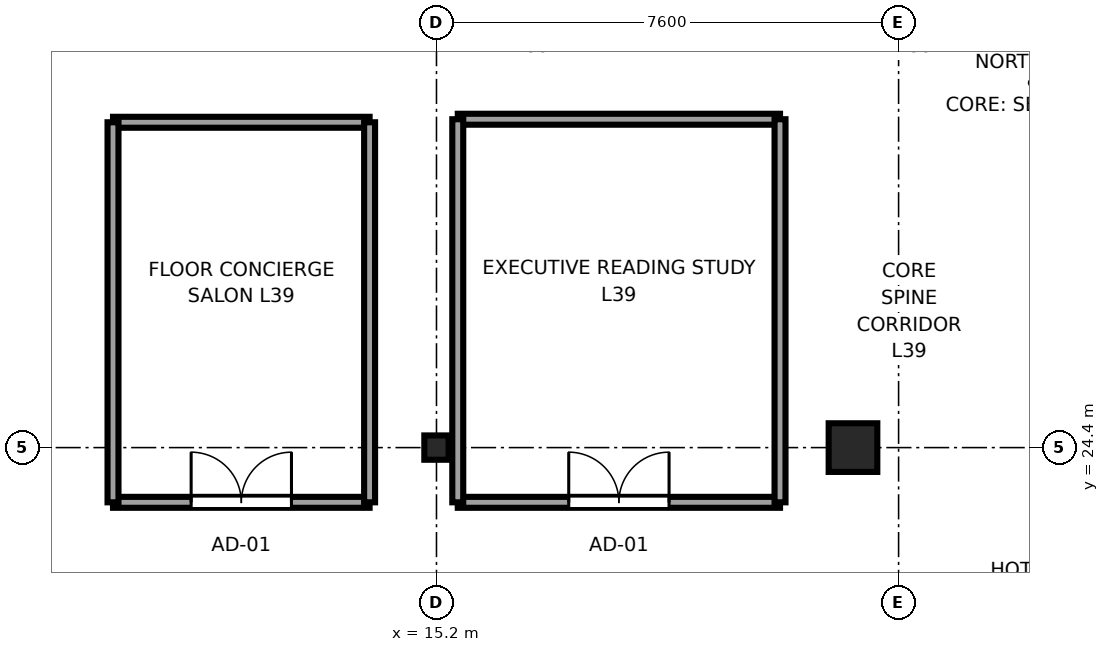
"""IFC4 building model, lengths in metres.
Left out: names, types, materials, properties, quantities, classifications, styles, units other than length and angle.
Written with IfcOpenShell. Run it as: python <this file> out.ifc"""

import sys

from ifc_helpers import new_model, si_unit, direction, frame, frame_2d, origin, origin_2d, place, context, subcontext, project, spatial, rectangle, i_section, extrude, source, transform, mapped, element, fill, save


model = new_model("IFC4")
c1 = context("Model", 3, precision=1e-05, world=origin(), true_north=direction((0.0, 1.0)))
c2 = subcontext(c1, "Body", "Model", "MODEL_VIEW")
j1 = project(units=[si_unit("LENGTHUNIT", "METRE"), si_unit("PLANEANGLEUNIT", "RADIAN")], contexts=[c1])
p1 = place(None, origin())
s1 = spatial("IfcSite", under=j1, at=p1, CompositionType="ELEMENT")
p2 = place(p1, origin())
s2 = spatial("IfcBuilding", under=s1, at=p2, CompositionType="ELEMENT")
p3 = place(p2, frame((0.0, 0.0, 150.6)))
s3 = spatial("IfcBuildingStorey", under=s2, at=p3, CompositionType="ELEMENT", Elevation=150.6)
m1 = source(origin(), c2, "Body", "SweptSolid", [
    extrude(i_section(OverallWidth=0.4, OverallDepth=0.4, WebThickness=0.02, FlangeThickness=0.035, at=origin_2d()), origin(), (0.0, 0.0, 1.0), 3.55),
])
p4 = place(p3, frame((15.2, 24.4, 0.0), z_axis=(0.0, 0.0, 1.0), x_axis=(1.0, 0.0, 0.0)))
e1 = element("IfcColumn", 1, at=p4, inside=s3, PredefinedType="COLUMN", context=c2, shape_type="MappedRepresentation", body=[
    mapped(m1, transform((0.0, 0.0, 0.0), x_axis=(1.0, 0.0, 0.0), y_axis=(0.0, 1.0, 0.0), z_axis=(0.0, 0.0, 1.0), scale=1.0)),
])
m2 = source(origin(), c2, "Body", "SweptSolid", [
    extrude(rectangle(XDim=0.8, YDim=0.8, at=origin_2d()), origin(), (0.0, 0.0, 1.0), 3.55),
])
p5 = place(p3, frame((22.05, 24.4, 0.0), z_axis=(0.0, 0.0, 1.0), x_axis=(1.0, 0.0, 0.0)))
e2 = element("IfcColumn", 2, at=p5, inside=s3, PredefinedType="COLUMN", context=c2, shape_type="MappedRepresentation", body=[
    mapped(m2, transform((0.0, 0.0, 0.0), x_axis=(1.0, 0.0, 0.0), y_axis=(0.0, 1.0, 0.0), z_axis=(0.0, 0.0, 1.0), scale=1.0)),
])
p6 = place(p3, frame((9.88, 23.5, 0.0), z_axis=(0.0, 0.0, 1.0), x_axis=(1.0, 0.0, 0.0)))
e3 = element("IfcWall", 3, at=p6, inside=s3, PredefinedType="PARTITIONING", context=c2, shape_type="SweptSolid", body=[
    extrude(rectangle(XDim=4.22, YDim=0.18, at=frame_2d((2.11, 0.0))), origin(), (0.0, 0.0, 1.0), 3.37),
])
p7 = place(p6, frame((1.285, 0.0, 0.0)))
e4 = element("IfcOpeningElement", 4, at=p7, cuts=e3, PredefinedType="OPENING", context=c2, shape_type="SweptSolid", body=[
    extrude(rectangle(XDim=1.65, YDim=2.15, at=frame_2d((0.825, 1.075))), frame((0.0, 0.1, 0.0), z_axis=(0.0, -1.0, 0.0), x_axis=(1.0, 0.0, 0.0)), (0.0, 0.0, 1.0), 0.2),
])
p8 = place(p3, frame((9.88, 29.75, 0.0), z_axis=(0.0, 0.0, 1.0), x_axis=(1.0, 0.0, 0.0)))
e5 = element("IfcWall", 5, at=p8, inside=s3, PredefinedType="PARTITIONING", context=c2, shape_type="SweptSolid", body=[
    extrude(rectangle(XDim=4.22, YDim=0.18, at=frame_2d((2.11, 0.0))), origin(), (0.0, 0.0, 1.0), 3.37),
])
for number, where, z_axis, x_axis in (
    (6, (9.88, 23.5, 0.0), (0.0, 0.0, 1.0), (0.0, 1.0, 0.0)),
    (7, (14.1, 23.5, 0.0), (0.0, 0.0, 1.0), (0.0, 1.0, 0.0)),
):
    element("IfcWall", number, at=place(p3, frame(where, z_axis=z_axis, x_axis=x_axis)), inside=s3, PredefinedType="PARTITIONING", context=c2, shape_type="SweptSolid", body=[
        extrude(rectangle(XDim=6.25, YDim=0.18, at=frame_2d((3.125, 0.0))), origin(), (0.0, 0.0, 1.0), 3.37),
    ])
p9 = place(p3, frame((15.55, 23.5, 0.0), z_axis=(0.0, 0.0, 1.0), x_axis=(1.0, 0.0, 0.0)))
e8 = element("IfcWall", 8, at=p9, inside=s3, PredefinedType="PARTITIONING", context=c2, shape_type="SweptSolid", body=[
    extrude(rectangle(XDim=5.3, YDim=0.18, at=frame_2d((2.65, 0.0))), origin(), (0.0, 0.0, 1.0), 3.37),
])
p10 = place(p9, frame((1.825, 0.0, 0.0)))
e9 = element("IfcOpeningElement", 9, at=p10, cuts=e8, PredefinedType="OPENING", context=c2, shape_type="SweptSolid", body=[
    extrude(rectangle(XDim=1.65, YDim=2.15, at=frame_2d((0.825, 1.075))), frame((0.0, 0.1, 0.0), z_axis=(0.0, -1.0, 0.0), x_axis=(1.0, 0.0, 0.0)), (0.0, 0.0, 1.0), 0.2),
])
p11 = place(p3, frame((15.55, 29.8, 0.0), z_axis=(0.0, 0.0, 1.0), x_axis=(1.0, 0.0, 0.0)))
e10 = element("IfcWall", 10, at=p11, inside=s3, PredefinedType="PARTITIONING", context=c2, shape_type="SweptSolid", body=[
    extrude(rectangle(XDim=5.3, YDim=0.18, at=frame_2d((2.65, 0.0))), origin(), (0.0, 0.0, 1.0), 3.37),
])
for number, where, z_axis, x_axis in (
    (11, (15.55, 23.5, 0.0), (0.0, 0.0, 1.0), (0.0, 1.0, 0.0)),
    (12, (20.85, 23.5, 0.0), (0.0, 0.0, 1.0), (0.0, 1.0, 0.0)),
):
    element("IfcWall", number, at=place(p3, frame(where, z_axis=z_axis, x_axis=x_axis)), inside=s3, PredefinedType="PARTITIONING", context=c2, shape_type="SweptSolid", body=[
        extrude(rectangle(XDim=6.3, YDim=0.18, at=frame_2d((3.15, 0.0))), origin(), (0.0, 0.0, 1.0), 3.37),
    ])
m3 = source(origin(), c2, "Body", "SweptSolid", [
    extrude(rectangle(XDim=1.65, YDim=2.15, at=frame_2d((0.825, 1.075))), frame((0.0, 0.025, 0.0), z_axis=(0.0, -1.0, 0.0), x_axis=(1.0, 0.0, 0.0)), (0.0, 0.0, 1.0), 0.05),
])
p12 = place(p7, origin())
e13 = element("IfcDoor", 13, at=p12, inside=s3, OperationType="DOUBLE_DOOR_SINGLE_SWING", PredefinedType="DOOR", context=c2, shape_type="MappedRepresentation", body=[
    mapped(m3, transform((0.0, 0.0, 0.0), x_axis=(1.0, 0.0, 0.0), y_axis=(0.0, 1.0, 0.0), z_axis=(0.0, 0.0, 1.0), scale=1.0)),
])
fill(e4, e13)
p13 = place(p10, origin())
e14 = element("IfcDoor", 14, at=p13, inside=s3, OperationType="DOUBLE_DOOR_SINGLE_SWING", PredefinedType="DOOR", context=c2, shape_type="MappedRepresentation", body=[
    mapped(m3, transform((0.0, 0.0, 0.0), x_axis=(1.0, 0.0, 0.0), y_axis=(0.0, 1.0, 0.0), z_axis=(0.0, 0.0, 1.0), scale=1.0)),
])
fill(e9, e14)
save(model, sys.argv[1])
